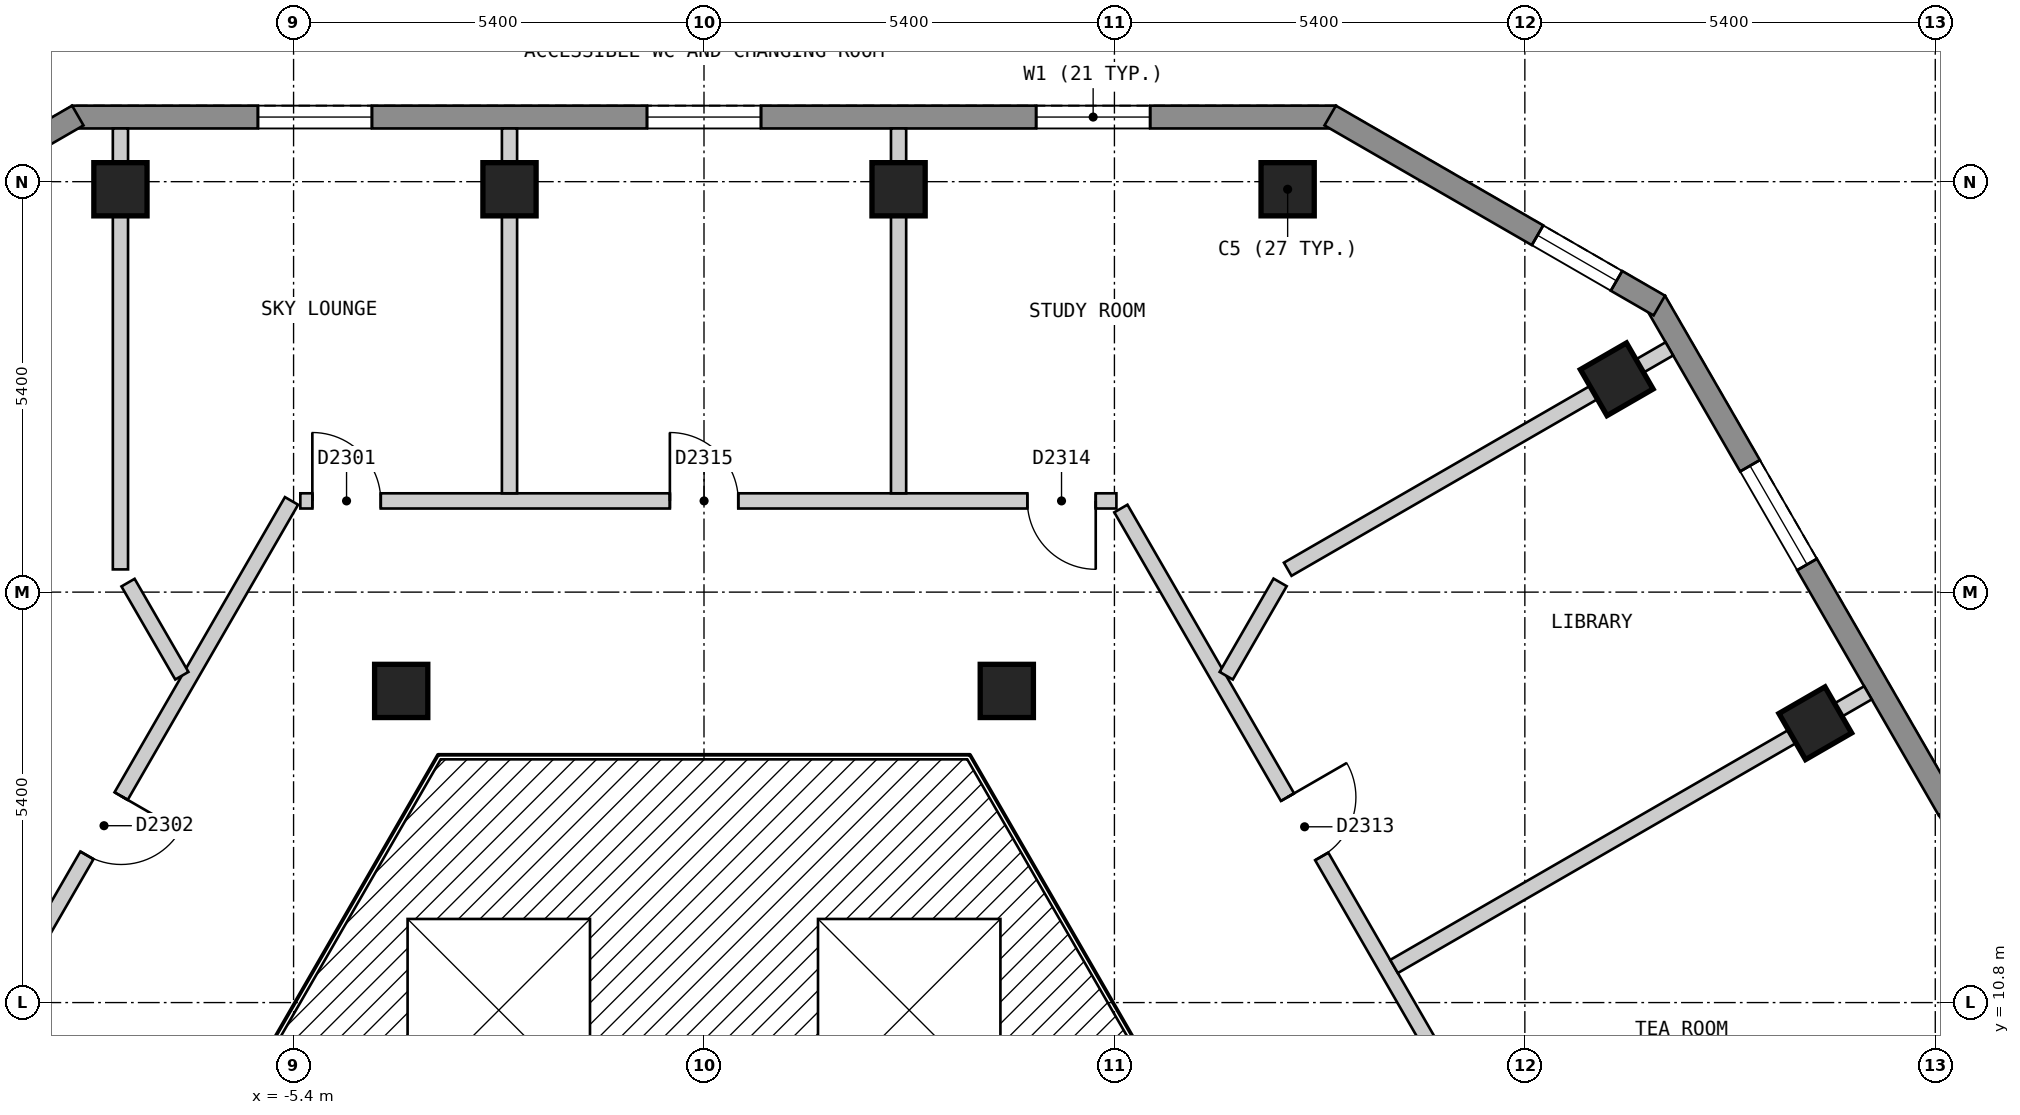
"""IFC4 building model, lengths in metres.
Left out: names, types, materials, properties, quantities, classifications, styles, units other than length and angle.
Written with IfcOpenShell. Run it as: python <this file> out.ifc"""

import sys

from ifc_helpers import new_model, si_unit, direction, frame, frame_2d, origin, origin_2d, place, context, subcontext, project, spatial, polyline, rectangle, outline, extrude, element, fill, save


model = new_model("IFC4")
c1 = context("Model", 3, precision=1e-05, world=origin(), true_north=direction((0.0, 1.0)))
c2 = subcontext(c1, "Body", "Model", "MODEL_VIEW")
j1 = project(units=[si_unit("LENGTHUNIT", "METRE"), si_unit("PLANEANGLEUNIT", "RADIAN")], contexts=[c1])
p1 = place(None, origin())
s1 = spatial("IfcSite", under=j1, at=p1, CompositionType="ELEMENT")
p2 = place(p1, origin())
s2 = spatial("IfcBuilding", under=s1, at=p2, CompositionType="ELEMENT")
p3 = place(p2, frame((0.0, 0.0, 241.8)))
s3 = spatial("IfcBuildingStorey", under=s2, at=p3, CompositionType="ELEMENT", Elevation=241.8)
for number, where, z_axis, x_axis in (
    (1, (7.679, 21.5, 0.0), (0.0, 0.0, 1.0), (-1.0, 0.0, 0.0)),
    (2, (2.56, 21.5, 0.0), (0.0, 0.0, 1.0), (-1.0, 0.0, 0.0)),
    (3, (-2.559, 21.5, 0.0), (0.0, 0.0, 1.0), (-1.0, 0.0, 0.0)),
    (4, (-7.678, 21.5, 0.0), (0.0, 0.0, 1.0), (-1.0, 0.0, 0.0)),
    (5, (14.621, 14.475, 0.0), (0.0, 0.0, 1.0), (-0.5, 0.866, 0.0)),
    (6, (12.009, 19.0, 0.0), (0.0, 0.0, 1.0), (-0.5, 0.866, 0.0)),
    (7, (3.984, 14.9, 0.0), (0.0, 0.0, 1.0), (1.0, 0.0, 0.0)),
    (8, (-3.984, 14.9, 0.0), (0.0, 0.0, 1.0), (1.0, 0.0, 0.0)),
):
    element("IfcColumn", number, at=place(p3, frame(where, z_axis=z_axis, x_axis=x_axis)), inside=s3, PredefinedType="COLUMN", context=c2, shape_type="SweptSolid", body=[
        extrude(rectangle(XDim=0.7, YDim=0.7, at=origin_2d()), origin(), (0.0, 0.0, 1.0), 3.0),
    ])
p4 = place(p3, frame((8.314, 22.45, 0.0), z_axis=(0.0, 0.0, 1.0), x_axis=(-1.0, 0.0, 0.0)))
e9 = element("IfcWall", 9, at=p4, inside=s3, PredefinedType="SOLIDWALL", context=c2, shape_type="SweptSolid", body=[
    extrude(outline(polyline([(0.0, -0.15), (16.628, -0.15), (16.548, 0.15), (0.08, 0.15), (0.0, -0.15)])), origin(), (0.0, 0.0, 1.0), 2.2),
])
p5 = place(p4, frame((2.444, 0.0, 0.15)))
e10 = element("IfcOpeningElement", 10, at=p5, cuts=e9, PredefinedType="OPENING", context=c2, shape_type="SweptSolid", body=[
    extrude(rectangle(XDim=1.5, YDim=2.1, at=frame_2d((0.75, 1.05))), frame((0.0, 0.16, 0.0), z_axis=(0.0, -1.0, 0.0), x_axis=(1.0, 0.0, 0.0)), (0.0, 0.0, 1.0), 0.32),
])
p6 = place(p4, frame((7.564, 0.0, 0.15)))
e11 = element("IfcOpeningElement", 11, at=p6, cuts=e9, PredefinedType="OPENING", context=c2, shape_type="SweptSolid", body=[
    extrude(rectangle(XDim=1.5, YDim=2.1, at=frame_2d((0.75, 1.05))), frame((0.0, 0.16, 0.0), z_axis=(0.0, -1.0, 0.0), x_axis=(1.0, 0.0, 0.0)), (0.0, 0.0, 1.0), 0.32),
])
p7 = place(p4, frame((12.683, 0.0, 0.15)))
e12 = element("IfcOpeningElement", 12, at=p7, cuts=e9, PredefinedType="OPENING", context=c2, shape_type="SweptSolid", body=[
    extrude(rectangle(XDim=1.5, YDim=2.1, at=frame_2d((0.75, 1.05))), frame((0.0, 0.16, 0.0), z_axis=(0.0, -1.0, 0.0), x_axis=(1.0, 0.0, 0.0)), (0.0, 0.0, 1.0), 0.32),
])
p8 = place(p3, frame((-8.239, 22.47, 0.0), z_axis=(0.0, 0.0, 1.0), x_axis=(-0.866022959057, -0.500004234368, 0.0)))
e13 = element("IfcWall", 13, at=p8, inside=s3, PredefinedType="SOLIDWALL", context=c2, shape_type="SweptSolid", body=[
    extrude(outline(polyline([(0.0, -0.15), (5.0, -0.15), (4.92, 0.15), (0.08, 0.15), (0.0, -0.15)])), origin(), (0.0, 0.0, 1.0), 2.2),
])
p9 = place(p8, frame((0.65, 0.0, 0.15)))
e14 = element("IfcOpeningElement", 14, at=p9, cuts=e13, PredefinedType="OPENING", context=c2, shape_type="SweptSolid", body=[
    extrude(rectangle(XDim=1.2, YDim=2.1, at=frame_2d((0.6, 1.05))), frame((0.0, 0.16, 0.0), z_axis=(0.0, -1.0, 0.0), x_axis=(1.0, 0.0, 0.0)), (0.0, 0.0, 1.0), 0.32),
])
p10 = place(p3, frame((23.599, 0.825, 0.0), z_axis=(0.0, 0.0, 1.0), x_axis=(-0.500003656944, 0.866023292436, 0.0)))
e15 = element("IfcWall", 15, at=p10, inside=s3, PredefinedType="SOLIDWALL", context=c2, shape_type="SweptSolid", body=[
    extrude(outline(polyline([(0.0, -0.15), (22.17, -0.15), (22.09, 0.15), (0.08, 0.15), (0.0, -0.15)])), origin(), (0.0, 0.0, 1.0), 2.2),
])
p11 = place(p10, frame((2.497, 0.0, 0.15)))
e16 = element("IfcOpeningElement", 16, at=p11, cuts=e15, PredefinedType="OPENING", context=c2, shape_type="SweptSolid", body=[
    extrude(rectangle(XDim=1.5, YDim=2.1, at=frame_2d((0.75, 1.05))), frame((0.0, 0.16, 0.0), z_axis=(0.0, -1.0, 0.0), x_axis=(1.0, 0.0, 0.0)), (0.0, 0.0, 1.0), 0.32),
])
p12 = place(p10, frame((7.723, 0.0, 0.15)))
e17 = element("IfcOpeningElement", 17, at=p12, cuts=e15, PredefinedType="OPENING", context=c2, shape_type="SweptSolid", body=[
    extrude(rectangle(XDim=1.5, YDim=2.1, at=frame_2d((0.75, 1.05))), frame((0.0, 0.16, 0.0), z_axis=(0.0, -1.0, 0.0), x_axis=(1.0, 0.0, 0.0)), (0.0, 0.0, 1.0), 0.32),
])
p13 = place(p10, frame((12.948, 0.0, 0.15)))
e18 = element("IfcOpeningElement", 18, at=p13, cuts=e15, PredefinedType="OPENING", context=c2, shape_type="SweptSolid", body=[
    extrude(rectangle(XDim=1.5, YDim=2.1, at=frame_2d((0.75, 1.05))), frame((0.0, 0.16, 0.0), z_axis=(0.0, -1.0, 0.0), x_axis=(1.0, 0.0, 0.0)), (0.0, 0.0, 1.0), 0.32),
])
p14 = place(p10, frame((18.173, 0.0, 0.15)))
e19 = element("IfcOpeningElement", 19, at=p14, cuts=e15, PredefinedType="OPENING", context=c2, shape_type="SweptSolid", body=[
    extrude(rectangle(XDim=1.5, YDim=2.1, at=frame_2d((0.75, 1.05))), frame((0.0, 0.16, 0.0), z_axis=(0.0, -1.0, 0.0), x_axis=(1.0, 0.0, 0.0)), (0.0, 0.0, 1.0), 0.32),
])
p15 = place(p3, frame((12.569, 19.97, 0.0), z_axis=(0.0, 0.0, 1.0), x_axis=(-0.866022959057, 0.500004234368, 0.0)))
e20 = element("IfcWall", 20, at=p15, inside=s3, PredefinedType="SOLIDWALL", context=c2, shape_type="SweptSolid", body=[
    extrude(outline(polyline([(0.0, -0.15), (5.0, -0.15), (4.92, 0.15), (0.08, 0.15), (0.0, -0.15)])), origin(), (0.0, 0.0, 1.0), 2.2),
])
p16 = place(p15, frame((0.65, 0.0, 0.15)))
e21 = element("IfcOpeningElement", 21, at=p16, cuts=e20, PredefinedType="OPENING", context=c2, shape_type="SweptSolid", body=[
    extrude(rectangle(XDim=1.2, YDim=2.1, at=frame_2d((0.6, 1.05))), frame((0.0, 0.16, 0.0), z_axis=(0.0, -1.0, 0.0), x_axis=(1.0, 0.0, 0.0)), (0.0, 0.0, 1.0), 0.32),
])
p17 = place(p3, frame((5.485, 17.3, 0.0), z_axis=(0.0, 0.0, 1.0), x_axis=(0.499943285704, -0.866058145322, 0.0)))
e22 = element("IfcWall", 22, at=p17, inside=s3, PredefinedType="PARTITIONING", context=c2, shape_type="SweptSolid", body=[
    extrude(rectangle(XDim=10.623, YDim=0.2, at=frame_2d((5.312, 0.0))), origin(), (0.0, 0.0, 1.0), 2.2),
])
p18 = place(p17, frame((9.176, 0.0, 0.0)))
e23 = element("IfcOpeningElement", 23, at=p18, cuts=e22, PredefinedType="OPENING", context=c2, shape_type="SweptSolid", body=[
    extrude(rectangle(XDim=0.9, YDim=2.1, at=frame_2d((0.45, 1.05))), frame((0.0, 0.11, 0.0), z_axis=(0.0, -1.0, 0.0), x_axis=(1.0, 0.0, 0.0)), (0.0, 0.0, 1.0), 0.22),
])
p19 = place(p17, frame((4.385, 0.0, 0.0)))
e24 = element("IfcOpeningElement", 24, at=p19, cuts=e22, PredefinedType="OPENING", context=c2, shape_type="SweptSolid", body=[
    extrude(rectangle(XDim=0.9, YDim=2.1, at=frame_2d((0.45, 1.05))), frame((0.0, 0.11, 0.0), z_axis=(0.0, -1.0, 0.0), x_axis=(1.0, 0.0, 0.0)), (0.0, 0.0, 1.0), 0.22),
])
p20 = place(p3, frame((-5.311, 17.4, 0.0), z_axis=(0.0, 0.0, 1.0), x_axis=(1.0, 0.0, 0.0)))
e25 = element("IfcWall", 25, at=p20, inside=s3, PredefinedType="PARTITIONING", context=c2, shape_type="SweptSolid", body=[
    extrude(rectangle(XDim=10.737, YDim=0.2, at=frame_2d((5.369, 0.0))), origin(), (0.0, 0.0, 1.0), 2.2),
])
p21 = place(p20, frame((0.158, 0.0, 0.0)))
e26 = element("IfcOpeningElement", 26, at=p21, cuts=e25, PredefinedType="OPENING", context=c2, shape_type="SweptSolid", body=[
    extrude(rectangle(XDim=0.9, YDim=2.1, at=frame_2d((0.45, 1.05))), frame((0.0, 0.11, 0.0), z_axis=(0.0, -1.0, 0.0), x_axis=(1.0, 0.0, 0.0)), (0.0, 0.0, 1.0), 0.22),
])
p22 = place(p20, frame((9.565, 0.0, 0.0)))
e27 = element("IfcOpeningElement", 27, at=p22, cuts=e25, PredefinedType="OPENING", context=c2, shape_type="SweptSolid", body=[
    extrude(rectangle(XDim=0.9, YDim=2.1, at=frame_2d((0.45, 1.05))), frame((0.0, 0.11, 0.0), z_axis=(0.0, -1.0, 0.0), x_axis=(1.0, 0.0, 0.0)), (0.0, 0.0, 1.0), 0.22),
])
p23 = place(p20, frame((4.862, 0.0, 0.0)))
e28 = element("IfcOpeningElement", 28, at=p23, cuts=e25, PredefinedType="OPENING", context=c2, shape_type="SweptSolid", body=[
    extrude(rectangle(XDim=0.9, YDim=2.1, at=frame_2d((0.45, 1.05))), frame((0.0, 0.11, 0.0), z_axis=(0.0, -1.0, 0.0), x_axis=(1.0, 0.0, 0.0)), (0.0, 0.0, 1.0), 0.22),
])
p24 = place(p3, frame((-10.854, 8.0, 0.0), z_axis=(0.0, 0.0, 1.0), x_axis=(0.499997637144, 0.866026767976, 0.0)))
e29 = element("IfcWall", 29, at=p24, inside=s3, PredefinedType="PARTITIONING", context=c2, shape_type="SweptSolid", body=[
    extrude(rectangle(XDim=10.854, YDim=0.2, at=frame_2d((5.427, 0.0))), origin(), (0.0, 0.0, 1.0), 2.2),
])
p25 = place(p24, frame((5.47, 0.0, 0.0)))
e30 = element("IfcOpeningElement", 30, at=p25, cuts=e29, PredefinedType="OPENING", context=c2, shape_type="SweptSolid", body=[
    extrude(rectangle(XDim=0.9, YDim=2.1, at=frame_2d((0.45, 1.05))), frame((0.0, 0.11, 0.0), z_axis=(0.0, -1.0, 0.0), x_axis=(1.0, 0.0, 0.0)), (0.0, 0.0, 1.0), 0.22),
])
p26 = place(p3, frame((-7.578, 16.325, 0.0), z_axis=(0.0, 0.0, 1.0), x_axis=(0.500314976313, -0.865843475737, 0.0)))
e31 = element("IfcWall", 31, at=p26, inside=s3, PredefinedType="PARTITIONING", context=c2, shape_type="SweptSolid", body=[
    extrude(rectangle(XDim=1.415, YDim=0.2, at=frame_2d((0.707, 0.0))), origin(), (0.0, 0.0, 1.0), 2.2),
])
p27 = place(p3, frame((6.871, 15.1, 0.0), z_axis=(0.0, 0.0, 1.0), x_axis=(0.50006528296, 0.865987709369, 0.0)))
e32 = element("IfcWall", 32, at=p27, inside=s3, PredefinedType="PARTITIONING", context=c2, shape_type="SweptSolid", body=[
    extrude(rectangle(XDim=1.418, YDim=0.2, at=frame_2d((0.709, 0.0))), origin(), (0.0, 0.0, 1.0), 2.2),
])
p28 = place(p3, frame((2.56, 17.5, 0.0), z_axis=(0.0, 0.0, 1.0), x_axis=(0.0, 1.0, 0.0)))
e33 = element("IfcWall", 33, at=p28, inside=s3, PredefinedType="PARTITIONING", context=c2, shape_type="SweptSolid", body=[
    extrude(rectangle(XDim=4.8, YDim=0.2, at=frame_2d((2.4, 0.0))), origin(), (0.0, 0.0, 1.0), 2.2),
])
p29 = place(p3, frame((-7.678, 16.499, 0.0), z_axis=(0.0, 0.0, 1.0), x_axis=(0.0, 1.0, 0.0)))
e34 = element("IfcWall", 34, at=p29, inside=s3, PredefinedType="PARTITIONING", context=c2, shape_type="SweptSolid", body=[
    extrude(rectangle(XDim=5.801, YDim=0.2, at=frame_2d((2.9, 0.0))), origin(), (0.0, 0.0, 1.0), 2.2),
])
p30 = place(p3, frame((-2.559, 17.5, 0.0), z_axis=(0.0, 0.0, 1.0), x_axis=(0.0, 1.0, 0.0)))
e35 = element("IfcWall", 35, at=p30, inside=s3, PredefinedType="PARTITIONING", context=c2, shape_type="SweptSolid", body=[
    extrude(rectangle(XDim=4.8, YDim=0.2, at=frame_2d((2.4, 0.0))), origin(), (0.0, 0.0, 1.0), 2.2),
])
p31 = place(p3, frame((9.354, 5.401, 0.0), z_axis=(0.0, 0.0, 1.0), x_axis=(0.866018411306, 0.500012111133, 0.0)))
e36 = element("IfcWall", 36, at=p31, inside=s3, PredefinedType="PARTITIONING", context=c2, shape_type="SweptSolid", body=[
    extrude(rectangle(XDim=9.898, YDim=0.2, at=frame_2d((4.949, 0.0))), origin(), (0.0, 0.0, 1.0), 2.2),
])
p32 = place(p3, frame((9.079, 11.275, 0.0), z_axis=(0.0, 0.0, 1.0), x_axis=(0.866001485781, 0.500041424909, 0.0)))
e37 = element("IfcWall", 37, at=p32, inside=s3, PredefinedType="PARTITIONING", context=c2, shape_type="SweptSolid", body=[
    extrude(rectangle(XDim=7.2, YDim=0.2, at=frame_2d((3.6, 0.0))), origin(), (0.0, 0.0, 1.0), 2.2),
])
p33 = place(p3, frame((7.68, 16.501, 0.0), z_axis=(0.0, 0.0, 1.0), x_axis=(0.86602149507, 0.500006770031, 0.0)))
e38 = element("IfcWall", 38, at=p33, inside=s3, PredefinedType="PARTITIONING", context=c2, shape_type="SweptSolid", body=[
    extrude(rectangle(XDim=5.798, YDim=0.2, at=frame_2d((2.899, 0.0))), origin(), (0.0, 0.0, 1.0), 2.2),
])
p34 = place(p5, origin())
e39 = element("IfcWindow", 39, at=p34, inside=s3, PartitioningType="SINGLE_PANEL", PredefinedType="WINDOW", context=c2, shape_type="SweptSolid", body=[
    extrude(rectangle(XDim=1.5, YDim=2.1, at=frame_2d((0.75, 1.05))), frame((0.0, 0.03, 0.0), z_axis=(0.0, -1.0, 0.0), x_axis=(1.0, 0.0, 0.0)), (0.0, 0.0, 1.0), 0.06),
])
fill(e10, e39)
p35 = place(p6, origin())
e40 = element("IfcWindow", 40, at=p35, inside=s3, PartitioningType="SINGLE_PANEL", PredefinedType="WINDOW", context=c2, shape_type="SweptSolid", body=[
    extrude(rectangle(XDim=1.5, YDim=2.1, at=frame_2d((0.75, 1.05))), frame((0.0, 0.03, 0.0), z_axis=(0.0, -1.0, 0.0), x_axis=(1.0, 0.0, 0.0)), (0.0, 0.0, 1.0), 0.06),
])
fill(e11, e40)
p36 = place(p7, origin())
e41 = element("IfcWindow", 41, at=p36, inside=s3, PartitioningType="SINGLE_PANEL", PredefinedType="WINDOW", context=c2, shape_type="SweptSolid", body=[
    extrude(rectangle(XDim=1.5, YDim=2.1, at=frame_2d((0.75, 1.05))), frame((0.0, 0.03, 0.0), z_axis=(0.0, -1.0, 0.0), x_axis=(1.0, 0.0, 0.0)), (0.0, 0.0, 1.0), 0.06),
])
fill(e12, e41)
p37 = place(p14, origin())
e42 = element("IfcWindow", 42, at=p37, inside=s3, PartitioningType="SINGLE_PANEL", PredefinedType="WINDOW", context=c2, shape_type="SweptSolid", body=[
    extrude(rectangle(XDim=1.5, YDim=2.1, at=frame_2d((0.75, 1.05))), frame((0.0, 0.03, 0.0), z_axis=(0.0, -1.0, 0.0), x_axis=(1.0, 0.0, 0.0)), (0.0, 0.0, 1.0), 0.06),
])
fill(e19, e42)
p38 = place(p16, origin())
e43 = element("IfcWindow", 43, at=p38, inside=s3, PartitioningType="SINGLE_PANEL", PredefinedType="WINDOW", context=c2, shape_type="SweptSolid", body=[
    extrude(rectangle(XDim=1.2, YDim=2.1, at=frame_2d((0.6, 1.05))), frame((0.0, 0.03, 0.0), z_axis=(0.0, -1.0, 0.0), x_axis=(1.0, 0.0, 0.0)), (0.0, 0.0, 1.0), 0.06),
])
fill(e21, e43)
p39 = place(p2, frame((0.0, 0.0, 244.8)))
p40 = place(p39, frame((0.0, 0.0, -0.8)))
p41 = place(p40, frame((-2.7, 10.7, 0.0)))
p42 = place(p41, frame((0.0, 0.0, 0.75)))
e44 = element("IfcWindow", 44, at=p42, inside=s3, PartitioningType="SINGLE_PANEL", PredefinedType="SKYLIGHT", context=c2, shape_type="SweptSolid", body=[
    extrude(rectangle(XDim=2.4, YDim=2.4, at=origin_2d()), origin(), (0.0, 0.0, 1.0), 0.05),
])
p43 = place(p40, frame((2.7, 10.7, 0.0)))
p44 = place(p43, frame((0.0, 0.0, 0.75)))
e45 = element("IfcWindow", 45, at=p44, inside=s3, PartitioningType="SINGLE_PANEL", PredefinedType="SKYLIGHT", context=c2, shape_type="SweptSolid", body=[
    extrude(rectangle(XDim=2.4, YDim=2.4, at=origin_2d()), origin(), (0.0, 0.0, 1.0), 0.05),
])
p45 = place(p21, origin())
e46 = element("IfcDoor", 46, at=p45, inside=s3, OperationType="SINGLE_SWING_LEFT", PredefinedType="DOOR", context=c2, shape_type="SweptSolid", body=[
    extrude(rectangle(XDim=0.9, YDim=2.1, at=frame_2d((0.45, 1.05))), frame((0.0, 0.025, 0.0), z_axis=(0.0, -1.0, 0.0), x_axis=(1.0, 0.0, 0.0)), (0.0, 0.0, 1.0), 0.05),
])
fill(e26, e46)
p46 = place(p25, origin())
e47 = element("IfcDoor", 47, at=p46, inside=s3, OperationType="SINGLE_SWING_RIGHT", PredefinedType="DOOR", context=c2, shape_type="SweptSolid", body=[
    extrude(rectangle(XDim=0.9, YDim=2.1, at=frame_2d((0.45, 1.05))), frame((0.0, 0.025, 0.0), z_axis=(0.0, -1.0, 0.0), x_axis=(1.0, 0.0, 0.0)), (0.0, 0.0, 1.0), 0.05),
])
fill(e30, e47)
p47 = place(p19, origin())
e48 = element("IfcDoor", 48, at=p47, inside=s3, OperationType="SINGLE_SWING_LEFT", PredefinedType="DOOR", context=c2, shape_type="SweptSolid", body=[
    extrude(rectangle(XDim=0.9, YDim=2.1, at=frame_2d((0.45, 1.05))), frame((0.0, 0.025, 0.0), z_axis=(0.0, -1.0, 0.0), x_axis=(1.0, 0.0, 0.0)), (0.0, 0.0, 1.0), 0.05),
])
fill(e24, e48)
p48 = place(p22, origin())
e49 = element("IfcDoor", 49, at=p48, inside=s3, OperationType="SINGLE_SWING_RIGHT", PredefinedType="DOOR", context=c2, shape_type="SweptSolid", body=[
    extrude(rectangle(XDim=0.9, YDim=2.1, at=frame_2d((0.45, 1.05))), frame((0.0, 0.025, 0.0), z_axis=(0.0, -1.0, 0.0), x_axis=(1.0, 0.0, 0.0)), (0.0, 0.0, 1.0), 0.05),
])
fill(e27, e49)
p49 = place(p23, origin())
e50 = element("IfcDoor", 50, at=p49, inside=s3, OperationType="SINGLE_SWING_LEFT", PredefinedType="DOOR", context=c2, shape_type="SweptSolid", body=[
    extrude(rectangle(XDim=0.9, YDim=2.1, at=frame_2d((0.45, 1.05))), frame((0.0, 0.025, 0.0), z_axis=(0.0, -1.0, 0.0), x_axis=(1.0, 0.0, 0.0)), (0.0, 0.0, 1.0), 0.05),
])
fill(e28, e50)
save(model, sys.argv[1])
